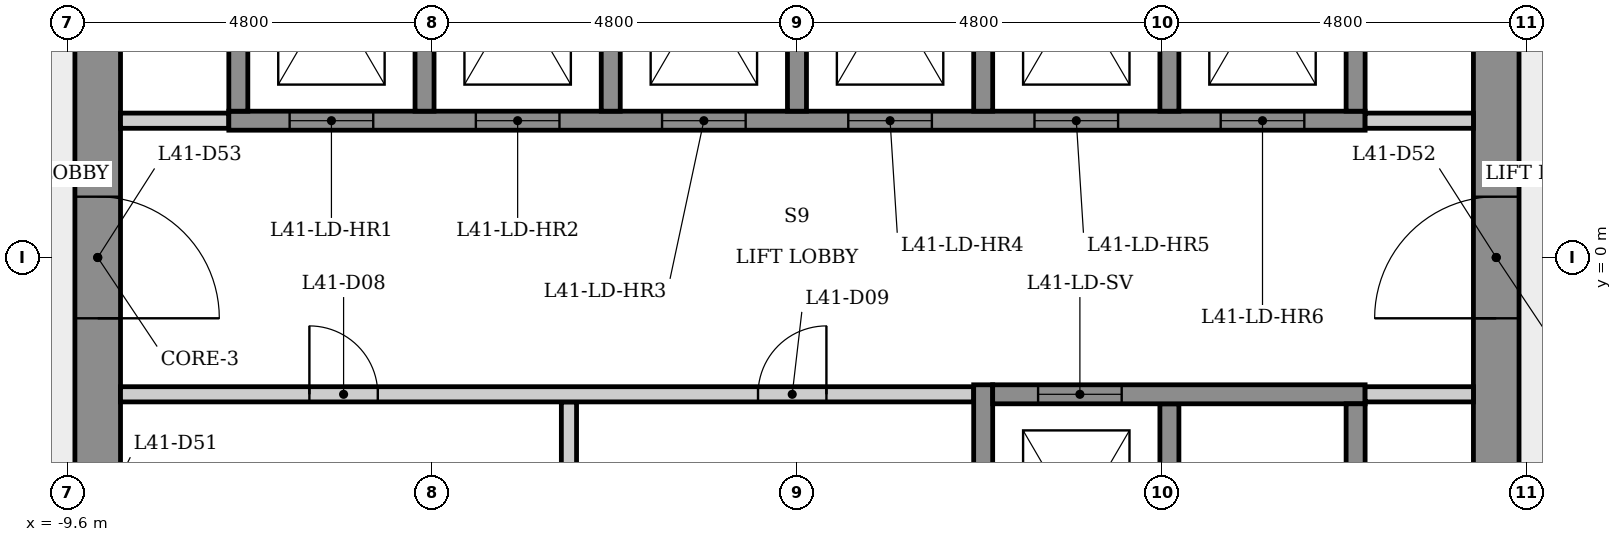
"""IFC4 building model, lengths in metres.
Left out: names, types, materials, properties, quantities, classifications, styles, units other than length and angle.
Written with IfcOpenShell. Run it as: python <this file> out.ifc"""

import sys

from ifc_helpers import new_model, si_unit, direction, frame, frame_2d, origin, place, context, subcontext, project, spatial, rectangle, extrude, element, fill, save


model = new_model("IFC4")
c1 = context("Model", 3, precision=1e-05, world=origin(), true_north=direction((0.0, 1.0)))
c2 = subcontext(c1, "Body", "Model", "MODEL_VIEW")
j1 = project(units=[si_unit("LENGTHUNIT", "METRE"), si_unit("PLANEANGLEUNIT", "RADIAN")], contexts=[c1])
p1 = place(None, origin())
s1 = spatial("IfcSite", under=j1, at=p1, CompositionType="ELEMENT")
p2 = place(p1, origin())
s2 = spatial("IfcBuilding", under=s1, at=p2, CompositionType="ELEMENT")
p3 = place(p2, frame((0.0, 0.0, 156.1)))
s3 = spatial("IfcBuildingStorey", under=s2, at=p3, CompositionType="ELEMENT", Elevation=156.1)
p4 = place(p3, frame((9.2, -5.485, 0.0), z_axis=(0.0, 0.0, 1.0), x_axis=(0.0, 1.0, 0.0)))
e1 = element("IfcWall", 1, at=p4, inside=s3, PredefinedType="SHEAR", context=c2, shape_type="SweptSolid", body=[
    extrude(rectangle(XDim=10.97, YDim=0.6, at=frame_2d((5.485, 0.0))), origin(), (0.0, 0.0, 1.0), 3.4),
])
p5 = place(p4, frame((4.685, 0.0, 0.0)))
e2 = element("IfcOpeningElement", 2, at=p5, cuts=e1, PredefinedType="OPENING", context=c2, shape_type="SweptSolid", body=[
    extrude(rectangle(XDim=1.6, YDim=2.1, at=frame_2d((0.8, 1.05))), frame((0.0, 0.31, 0.0), z_axis=(0.0, -1.0, 0.0), x_axis=(1.0, 0.0, 0.0)), (0.0, 0.0, 1.0), 0.62),
])
p6 = place(p3, frame((-9.2, 5.485, 0.0), z_axis=(0.0, 0.0, 1.0), x_axis=(0.0, -1.0, 0.0)))
e3 = element("IfcWall", 3, at=p6, inside=s3, PredefinedType="SHEAR", context=c2, shape_type="SweptSolid", body=[
    extrude(rectangle(XDim=10.97, YDim=0.6, at=frame_2d((5.485, 0.0))), origin(), (0.0, 0.0, 1.0), 3.4),
])
p7 = place(p6, frame((8.516, 0.0, 0.0)))
e4 = element("IfcOpeningElement", 4, at=p7, cuts=e3, PredefinedType="OPENING", context=c2, shape_type="SweptSolid", body=[
    extrude(rectangle(XDim=0.9, YDim=2.1, at=frame_2d((0.45, 1.05))), frame((0.0, 0.31, 0.0), z_axis=(0.0, -1.0, 0.0), x_axis=(1.0, 0.0, 0.0)), (0.0, 0.0, 1.0), 0.62),
])
p8 = place(p6, frame((4.685, 0.0, 0.0)))
e5 = element("IfcOpeningElement", 5, at=p8, cuts=e3, PredefinedType="OPENING", context=c2, shape_type="SweptSolid", body=[
    extrude(rectangle(XDim=1.6, YDim=2.1, at=frame_2d((0.8, 1.05))), frame((0.0, 0.31, 0.0), z_axis=(0.0, -1.0, 0.0), x_axis=(1.0, 0.0, 0.0)), (0.0, 0.0, 1.0), 0.62),
])
p9 = place(p3, frame((-8.9, 1.8, 0.0), z_axis=(0.0, 0.0, 1.0), x_axis=(1.0, 0.0, 0.0)))
e6 = element("IfcWall", 6, at=p9, inside=s3, PredefinedType="PARTITIONING", context=c2, shape_type="SweptSolid", body=[
    extrude(rectangle(XDim=1.425, YDim=0.2, at=frame_2d((0.712, 0.0))), origin(), (0.0, 0.0, 1.0), 3.05),
])
p10 = place(p3, frame((-7.475, 1.8, 0.0), z_axis=(0.0, 0.0, 1.0), x_axis=(1.0, 0.0, 0.0)))
e7 = element("IfcWall", 7, at=p10, inside=s3, PredefinedType="SHEAR", context=c2, shape_type="SweptSolid", body=[
    extrude(rectangle(XDim=14.95, YDim=0.25, at=frame_2d((7.475, 0.0))), origin(), (0.0, 0.0, 1.0), 3.05),
])
p11 = place(p10, frame((0.8, 0.0, 0.0)))
e8 = element("IfcOpeningElement", 8, at=p11, cuts=e7, PredefinedType="OPENING", context=c2, shape_type="SweptSolid", body=[
    extrude(rectangle(XDim=1.1, YDim=2.1, at=frame_2d((0.55, 1.05))), frame((0.0, 0.135, 0.0), z_axis=(0.0, -1.0, 0.0), x_axis=(1.0, 0.0, 0.0)), (0.0, 0.0, 1.0), 0.27),
])
p12 = place(p10, frame((3.25, 0.0, 0.0)))
e9 = element("IfcOpeningElement", 9, at=p12, cuts=e7, PredefinedType="OPENING", context=c2, shape_type="SweptSolid", body=[
    extrude(rectangle(XDim=1.1, YDim=2.1, at=frame_2d((0.55, 1.05))), frame((0.0, 0.135, 0.0), z_axis=(0.0, -1.0, 0.0), x_axis=(1.0, 0.0, 0.0)), (0.0, 0.0, 1.0), 0.27),
])
p13 = place(p10, frame((5.7, 0.0, 0.0)))
e10 = element("IfcOpeningElement", 10, at=p13, cuts=e7, PredefinedType="OPENING", context=c2, shape_type="SweptSolid", body=[
    extrude(rectangle(XDim=1.1, YDim=2.1, at=frame_2d((0.55, 1.05))), frame((0.0, 0.135, 0.0), z_axis=(0.0, -1.0, 0.0), x_axis=(1.0, 0.0, 0.0)), (0.0, 0.0, 1.0), 0.27),
])
p14 = place(p10, frame((8.15, 0.0, 0.0)))
e11 = element("IfcOpeningElement", 11, at=p14, cuts=e7, PredefinedType="OPENING", context=c2, shape_type="SweptSolid", body=[
    extrude(rectangle(XDim=1.1, YDim=2.1, at=frame_2d((0.55, 1.05))), frame((0.0, 0.135, 0.0), z_axis=(0.0, -1.0, 0.0), x_axis=(1.0, 0.0, 0.0)), (0.0, 0.0, 1.0), 0.27),
])
p15 = place(p10, frame((10.6, 0.0, 0.0)))
e12 = element("IfcOpeningElement", 12, at=p15, cuts=e7, PredefinedType="OPENING", context=c2, shape_type="SweptSolid", body=[
    extrude(rectangle(XDim=1.1, YDim=2.1, at=frame_2d((0.55, 1.05))), frame((0.0, 0.135, 0.0), z_axis=(0.0, -1.0, 0.0), x_axis=(1.0, 0.0, 0.0)), (0.0, 0.0, 1.0), 0.27),
])
p16 = place(p10, frame((13.05, 0.0, 0.0)))
e13 = element("IfcOpeningElement", 13, at=p16, cuts=e7, PredefinedType="OPENING", context=c2, shape_type="SweptSolid", body=[
    extrude(rectangle(XDim=1.1, YDim=2.1, at=frame_2d((0.55, 1.05))), frame((0.0, 0.135, 0.0), z_axis=(0.0, -1.0, 0.0), x_axis=(1.0, 0.0, 0.0)), (0.0, 0.0, 1.0), 0.27),
])
p17 = place(p3, frame((-7.35, 1.925, 0.0), z_axis=(0.0, 0.0, 1.0), x_axis=(0.0, 1.0, 0.0)))
e14 = element("IfcWall", 14, at=p17, inside=s3, PredefinedType="SHEAR", context=c2, shape_type="SweptSolid", body=[
    extrude(rectangle(XDim=4.036, YDim=0.25, at=frame_2d((2.018, 0.0))), origin(), (0.0, 0.0, 1.0), 3.05),
])
p18 = place(p3, frame((-4.9, 5.025, 0.0), z_axis=(0.0, 0.0, 1.0), x_axis=(0.0, -1.0, 0.0)))
e15 = element("IfcWall", 15, at=p18, inside=s3, PredefinedType="SHEAR", context=c2, shape_type="SweptSolid", body=[
    extrude(rectangle(XDim=3.1, YDim=0.25, at=frame_2d((1.55, 0.0))), origin(), (0.0, 0.0, 1.0), 3.4),
])
p19 = place(p3, frame((-3.0, -1.9, 0.0), z_axis=(0.0, 0.0, 1.0), x_axis=(0.0, -1.0, 0.0)))
e16 = element("IfcWall", 16, at=p19, inside=s3, PredefinedType="PARTITIONING", context=c2, shape_type="SweptSolid", body=[
    extrude(rectangle(XDim=3.15, YDim=0.2, at=frame_2d((1.575, 0.0))), origin(), (0.0, 0.0, 1.0), 3.05),
])
p20 = place(p3, frame((-8.9, -1.8, 0.0), z_axis=(0.0, 0.0, 1.0), x_axis=(1.0, 0.0, 0.0)))
e17 = element("IfcWall", 17, at=p20, inside=s3, PredefinedType="PARTITIONING", context=c2, shape_type="SweptSolid", body=[
    extrude(rectangle(XDim=11.225, YDim=0.2, at=frame_2d((5.613, 0.0))), origin(), (0.0, 0.0, 1.0), 3.05),
])
p21 = place(p20, frame((2.485, 0.0, 0.0)))
e18 = element("IfcOpeningElement", 18, at=p21, cuts=e17, PredefinedType="OPENING", context=c2, shape_type="SweptSolid", body=[
    extrude(rectangle(XDim=0.9, YDim=2.1, at=frame_2d((0.45, 1.05))), frame((0.0, 0.11, 0.0), z_axis=(0.0, -1.0, 0.0), x_axis=(1.0, 0.0, 0.0)), (0.0, 0.0, 1.0), 0.22),
])
p22 = place(p20, frame((8.387, 0.0, 0.0)))
e19 = element("IfcOpeningElement", 19, at=p22, cuts=e17, PredefinedType="OPENING", context=c2, shape_type="SweptSolid", body=[
    extrude(rectangle(XDim=0.9, YDim=2.1, at=frame_2d((0.45, 1.05))), frame((0.0, 0.11, 0.0), z_axis=(0.0, -1.0, 0.0), x_axis=(1.0, 0.0, 0.0)), (0.0, 0.0, 1.0), 0.22),
])
for number, where, z_axis, x_axis in (
    (20, (-2.45, 5.025, 0.0), (0.0, 0.0, 1.0), (0.0, -1.0, 0.0)),
    (21, (0.0, 5.025, 0.0), (0.0, 0.0, 1.0), (0.0, -1.0, 0.0)),
):
    element("IfcWall", number, at=place(p3, frame(where, z_axis=z_axis, x_axis=x_axis)), inside=s3, PredefinedType="SHEAR", context=c2, shape_type="SweptSolid", body=[
        extrude(rectangle(XDim=3.1, YDim=0.25, at=frame_2d((1.55, 0.0))), origin(), (0.0, 0.0, 1.0), 3.4),
    ])
p23 = place(p3, frame((2.45, -5.275, 0.0), z_axis=(0.0, 0.0, 1.0), x_axis=(0.0, 1.0, 0.0)))
e22 = element("IfcWall", 22, at=p23, inside=s3, PredefinedType="SHEAR", context=c2, shape_type="SweptSolid", body=[
    extrude(rectangle(XDim=3.6, YDim=0.25, at=frame_2d((1.8, 0.0))), origin(), (0.0, 0.0, 1.0), 3.05),
])
for number, where, z_axis, x_axis in (
    (23, (2.45, 5.025, 0.0), (0.0, 0.0, 1.0), (0.0, -1.0, 0.0)),
    (24, (4.9, -1.925, 0.0), (0.0, 0.0, 1.0), (0.0, -1.0, 0.0)),
    (25, (4.9, 5.025, 0.0), (0.0, 0.0, 1.0), (0.0, -1.0, 0.0)),
):
    element("IfcWall", number, at=place(p3, frame(where, z_axis=z_axis, x_axis=x_axis)), inside=s3, PredefinedType="SHEAR", context=c2, shape_type="SweptSolid", body=[
        extrude(rectangle(XDim=3.1, YDim=0.25, at=frame_2d((1.55, 0.0))), origin(), (0.0, 0.0, 1.0), 3.4),
    ])
p24 = place(p3, frame((2.575, -1.8, 0.0), z_axis=(0.0, 0.0, 1.0), x_axis=(1.0, 0.0, 0.0)))
e26 = element("IfcWall", 26, at=p24, inside=s3, PredefinedType="SHEAR", context=c2, shape_type="SweptSolid", body=[
    extrude(rectangle(XDim=4.9, YDim=0.25, at=frame_2d((2.45, 0.0))), origin(), (0.0, 0.0, 1.0), 3.05),
])
p25 = place(p24, frame((0.597, 0.0, 0.0)))
e27 = element("IfcOpeningElement", 27, at=p25, cuts=e26, PredefinedType="OPENING", context=c2, shape_type="SweptSolid", body=[
    extrude(rectangle(XDim=1.1, YDim=2.1, at=frame_2d((0.55, 1.05))), frame((0.0, 0.135, 0.0), z_axis=(0.0, -1.0, 0.0), x_axis=(1.0, 0.0, 0.0)), (0.0, 0.0, 1.0), 0.27),
])
p26 = place(p3, frame((7.475, 1.8, 0.0), z_axis=(0.0, 0.0, 1.0), x_axis=(1.0, 0.0, 0.0)))
e28 = element("IfcWall", 28, at=p26, inside=s3, PredefinedType="PARTITIONING", context=c2, shape_type="SweptSolid", body=[
    extrude(rectangle(XDim=1.425, YDim=0.2, at=frame_2d((0.712, 0.0))), origin(), (0.0, 0.0, 1.0), 3.05),
])
for number, where, z_axis, x_axis in (
    (29, (7.35, -1.925, 0.0), (0.0, 0.0, 1.0), (0.0, -1.0, 0.0)),
    (30, (7.35, 5.025, 0.0), (0.0, 0.0, 1.0), (0.0, -1.0, 0.0)),
):
    element("IfcWall", number, at=place(p3, frame(where, z_axis=z_axis, x_axis=x_axis)), inside=s3, PredefinedType="SHEAR", context=c2, shape_type="SweptSolid", body=[
        extrude(rectangle(XDim=3.1, YDim=0.25, at=frame_2d((1.55, 0.0))), origin(), (0.0, 0.0, 1.0), 3.4),
    ])
p27 = place(p3, frame((8.9, -1.8, 0.0), z_axis=(0.0, 0.0, 1.0), x_axis=(-1.0, 0.0, 0.0)))
e31 = element("IfcWall", 31, at=p27, inside=s3, PredefinedType="PARTITIONING", context=c2, shape_type="SweptSolid", body=[
    extrude(rectangle(XDim=1.425, YDim=0.2, at=frame_2d((0.712, 0.0))), origin(), (0.0, 0.0, 1.0), 3.05),
])
p28 = place(p11, origin())
e32 = element("IfcDoor", 32, at=p28, inside=s3, OperationType="SLIDING_TO_LEFT", PredefinedType="DOOR", context=c2, shape_type="SweptSolid", body=[
    extrude(rectangle(XDim=1.1, YDim=2.1, at=frame_2d((0.55, 1.05))), frame((0.0, 0.025, 0.0), z_axis=(0.0, -1.0, 0.0), x_axis=(1.0, 0.0, 0.0)), (0.0, 0.0, 1.0), 0.05),
])
fill(e8, e32)
p29 = place(p12, origin())
e33 = element("IfcDoor", 33, at=p29, inside=s3, OperationType="SLIDING_TO_LEFT", PredefinedType="DOOR", context=c2, shape_type="SweptSolid", body=[
    extrude(rectangle(XDim=1.1, YDim=2.1, at=frame_2d((0.55, 1.05))), frame((0.0, 0.025, 0.0), z_axis=(0.0, -1.0, 0.0), x_axis=(1.0, 0.0, 0.0)), (0.0, 0.0, 1.0), 0.05),
])
fill(e9, e33)
p30 = place(p13, origin())
e34 = element("IfcDoor", 34, at=p30, inside=s3, OperationType="SLIDING_TO_LEFT", PredefinedType="DOOR", context=c2, shape_type="SweptSolid", body=[
    extrude(rectangle(XDim=1.1, YDim=2.1, at=frame_2d((0.55, 1.05))), frame((0.0, 0.025, 0.0), z_axis=(0.0, -1.0, 0.0), x_axis=(1.0, 0.0, 0.0)), (0.0, 0.0, 1.0), 0.05),
])
fill(e10, e34)
p31 = place(p14, origin())
e35 = element("IfcDoor", 35, at=p31, inside=s3, OperationType="SLIDING_TO_LEFT", PredefinedType="DOOR", context=c2, shape_type="SweptSolid", body=[
    extrude(rectangle(XDim=1.1, YDim=2.1, at=frame_2d((0.55, 1.05))), frame((0.0, 0.025, 0.0), z_axis=(0.0, -1.0, 0.0), x_axis=(1.0, 0.0, 0.0)), (0.0, 0.0, 1.0), 0.05),
])
fill(e11, e35)
p32 = place(p15, origin())
e36 = element("IfcDoor", 36, at=p32, inside=s3, OperationType="SLIDING_TO_LEFT", PredefinedType="DOOR", context=c2, shape_type="SweptSolid", body=[
    extrude(rectangle(XDim=1.1, YDim=2.1, at=frame_2d((0.55, 1.05))), frame((0.0, 0.025, 0.0), z_axis=(0.0, -1.0, 0.0), x_axis=(1.0, 0.0, 0.0)), (0.0, 0.0, 1.0), 0.05),
])
fill(e12, e36)
p33 = place(p16, origin())
e37 = element("IfcDoor", 37, at=p33, inside=s3, OperationType="SLIDING_TO_LEFT", PredefinedType="DOOR", context=c2, shape_type="SweptSolid", body=[
    extrude(rectangle(XDim=1.1, YDim=2.1, at=frame_2d((0.55, 1.05))), frame((0.0, 0.025, 0.0), z_axis=(0.0, -1.0, 0.0), x_axis=(1.0, 0.0, 0.0)), (0.0, 0.0, 1.0), 0.05),
])
fill(e13, e37)
p34 = place(p25, origin())
e38 = element("IfcDoor", 38, at=p34, inside=s3, OperationType="SLIDING_TO_LEFT", PredefinedType="DOOR", context=c2, shape_type="SweptSolid", body=[
    extrude(rectangle(XDim=1.1, YDim=2.1, at=frame_2d((0.55, 1.05))), frame((0.0, 0.025, 0.0), z_axis=(0.0, -1.0, 0.0), x_axis=(1.0, 0.0, 0.0)), (0.0, 0.0, 1.0), 0.05),
])
fill(e27, e38)
p35 = place(p21, origin())
e39 = element("IfcDoor", 39, at=p35, inside=s3, OperationType="SINGLE_SWING_LEFT", PredefinedType="DOOR", context=c2, shape_type="SweptSolid", body=[
    extrude(rectangle(XDim=0.9, YDim=2.1, at=frame_2d((0.45, 1.05))), frame((0.0, 0.025, 0.0), z_axis=(0.0, -1.0, 0.0), x_axis=(1.0, 0.0, 0.0)), (0.0, 0.0, 1.0), 0.05),
])
fill(e18, e39)
p36 = place(p22, origin())
e40 = element("IfcDoor", 40, at=p36, inside=s3, OperationType="SINGLE_SWING_RIGHT", PredefinedType="DOOR", context=c2, shape_type="SweptSolid", body=[
    extrude(rectangle(XDim=0.9, YDim=2.1, at=frame_2d((0.45, 1.05))), frame((0.0, 0.025, 0.0), z_axis=(0.0, -1.0, 0.0), x_axis=(1.0, 0.0, 0.0)), (0.0, 0.0, 1.0), 0.05),
])
fill(e19, e40)
p37 = place(p5, origin())
e41 = element("IfcDoor", 41, at=p37, inside=s3, OperationType="SINGLE_SWING_LEFT", PredefinedType="DOOR", context=c2, shape_type="SweptSolid", body=[
    extrude(rectangle(XDim=1.6, YDim=2.1, at=frame_2d((0.8, 1.05))), frame((0.0, 0.025, 0.0), z_axis=(0.0, -1.0, 0.0), x_axis=(1.0, 0.0, 0.0)), (0.0, 0.0, 1.0), 0.05),
])
fill(e2, e41)
p38 = place(p8, origin())
e42 = element("IfcDoor", 42, at=p38, inside=s3, OperationType="SINGLE_SWING_RIGHT", PredefinedType="DOOR", context=c2, shape_type="SweptSolid", body=[
    extrude(rectangle(XDim=1.6, YDim=2.1, at=frame_2d((0.8, 1.05))), frame((0.0, 0.025, 0.0), z_axis=(0.0, -1.0, 0.0), x_axis=(1.0, 0.0, 0.0)), (0.0, 0.0, 1.0), 0.05),
])
fill(e5, e42)
save(model, sys.argv[1])
